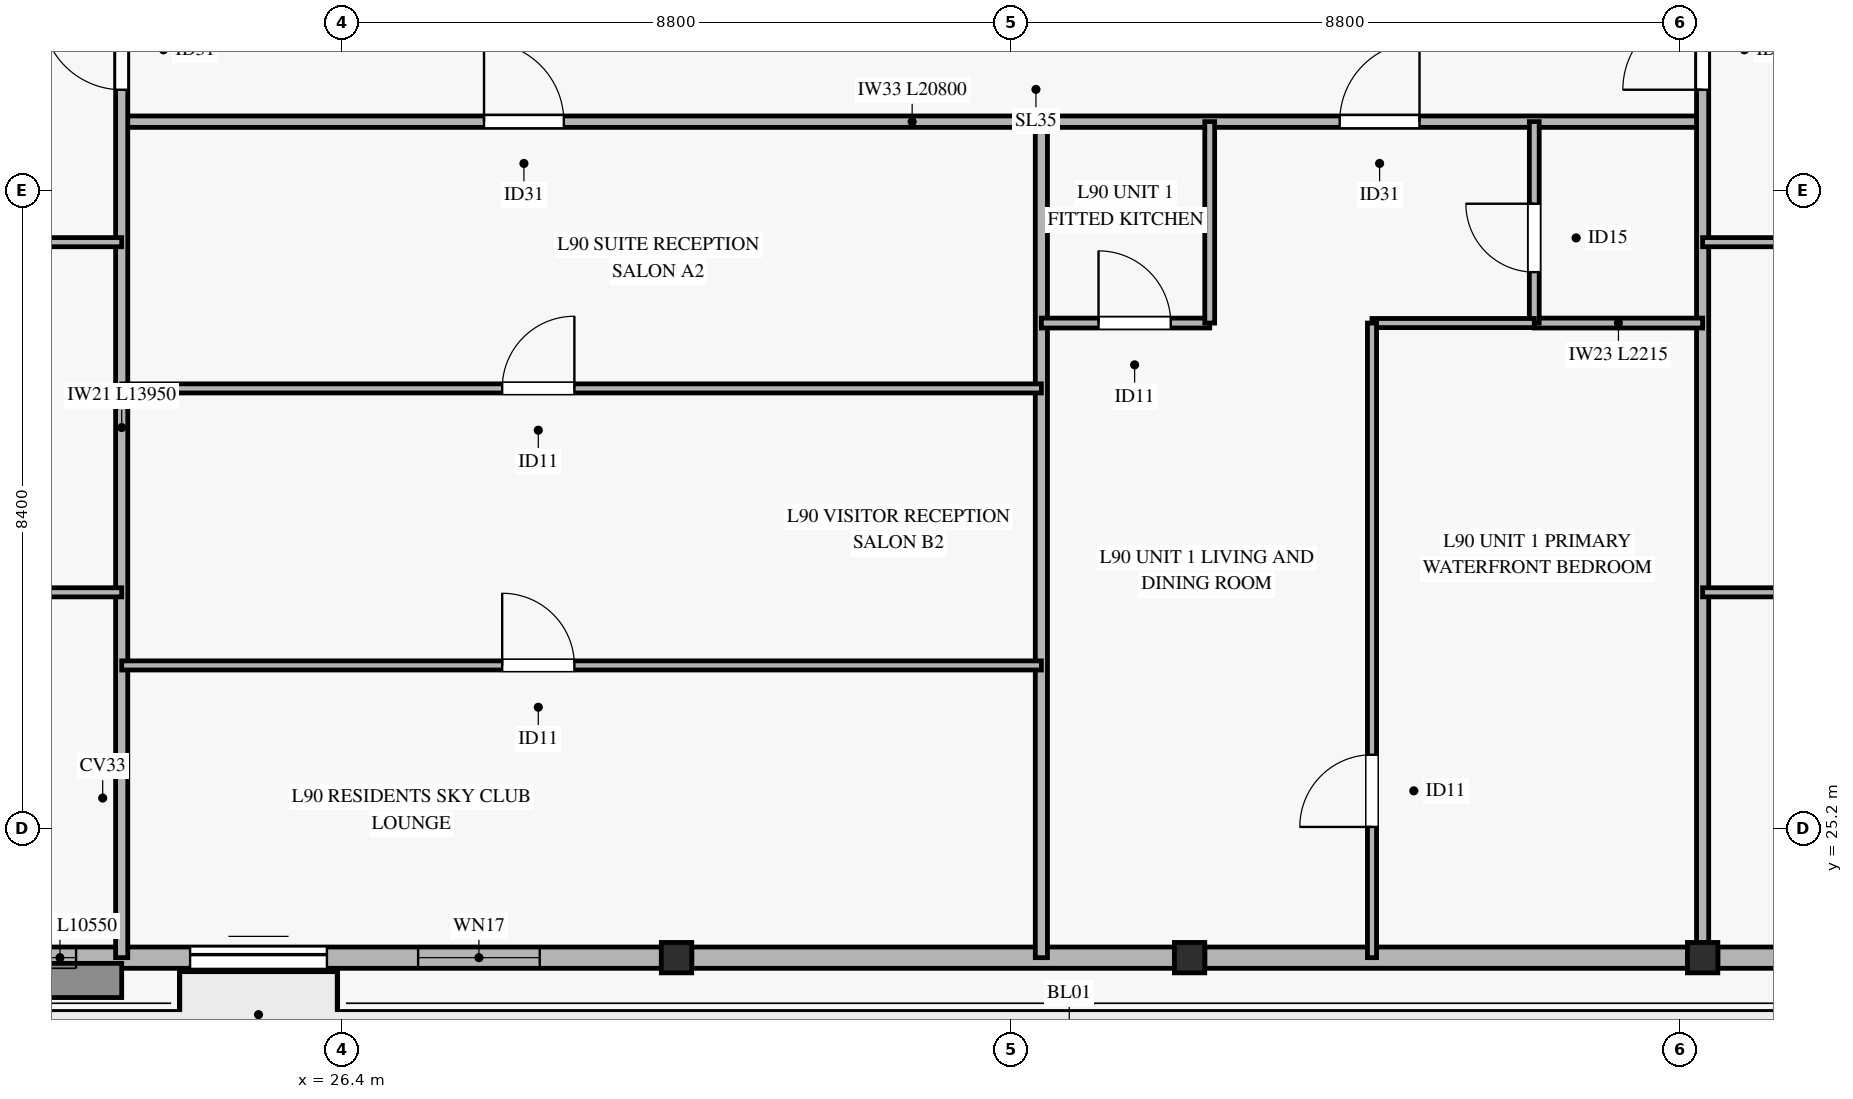
"""IFC4 building model, lengths in metres.
Left out: names, types, materials, properties, quantities, classifications, styles, units other than length and angle.
Written with IfcOpenShell. Run it as: python <this file> out.ifc"""

import sys

from ifc_helpers import new_model, si_unit, direction, frame, frame_2d, origin, origin_2d, place, context, subcontext, project, spatial, rectangle, hollow_rectangle, extrude, source, transform, mapped, element, fill, save


model = new_model("IFC4")
c1 = context("Model", 3, precision=1e-05, world=origin(), true_north=direction((0.0, 1.0)))
c2 = subcontext(c1, "Body", "Model", "MODEL_VIEW")
j1 = project(units=[si_unit("LENGTHUNIT", "METRE"), si_unit("PLANEANGLEUNIT", "RADIAN")], contexts=[c1])
p1 = place(None, origin())
s1 = spatial("IfcSite", under=j1, at=p1, CompositionType="ELEMENT")
p2 = place(p1, origin())
s2 = spatial("IfcBuilding", under=s1, at=p2, CompositionType="ELEMENT")
p3 = place(p2, frame((0.0, 0.0, 345.9)))
s3 = spatial("IfcBuildingStorey", under=s2, at=p3, CompositionType="ELEMENT", Elevation=345.9)
m1 = source(origin(), c2, "Body", "SweptSolid", [
    extrude(hollow_rectangle(XDim=0.4, YDim=0.4, WallThickness=0.02, at=origin_2d()), origin(), (0.0, 0.0, 1.0), 3.185),
])
for number, where, z_axis, x_axis in (
    (1, (30.8, 23.5, 0.0), (0.0, 0.0, 1.0), (1.0, 0.0, 0.0)),
    (2, (37.55, 23.5, 0.0), (0.0, 0.0, 1.0), (1.0, 0.0, 0.0)),
    (3, (44.3, 23.5, 0.0), (0.0, 0.0, 1.0), (1.0, 0.0, 0.0)),
):
    element("IfcColumn", number, at=place(p3, frame(where, z_axis=z_axis, x_axis=x_axis)), inside=s3, PredefinedType="COLUMN", context=c2, shape_type="MappedRepresentation", body=[
        mapped(m1, transform((0.0, 0.0, 0.0), x_axis=(1.0, 0.0, 0.0), y_axis=(0.0, 1.0, 0.0), z_axis=(0.0, 0.0, 1.0), scale=1.0)),
    ])
p4 = place(p3, frame((20.05, 23.5, 0.0), z_axis=(0.0, 0.0, 1.0), x_axis=(1.0, 0.0, 0.0)))
e4 = element("IfcWall", 4, at=p4, inside=s3, PredefinedType="SOLIDWALL", context=c2, shape_type="SweptSolid", body=[
    extrude(rectangle(XDim=10.55, YDim=0.28, at=frame_2d((5.275, 0.0))), origin(), (0.0, 0.0, 1.0), 2.815),
])
p5 = place(p4, frame((4.35, 0.0, 0.0)))
e5 = element("IfcOpeningElement", 5, at=p5, cuts=e4, PredefinedType="OPENING", context=c2, shape_type="SweptSolid", body=[
    extrude(rectangle(XDim=1.8, YDim=2.25, at=frame_2d((0.9, 1.125))), frame((0.0, 0.15, 0.0), z_axis=(0.0, -1.0, 0.0), x_axis=(1.0, 0.0, 0.0)), (0.0, 0.0, 1.0), 0.3),
])
p6 = place(p4, frame((0.65, 0.0, 0.45)))
e6 = element("IfcOpeningElement", 6, at=p6, cuts=e4, PredefinedType="OPENING", context=c2, shape_type="SweptSolid", body=[
    extrude(rectangle(XDim=2.2, YDim=2.1, at=frame_2d((1.1, 1.05))), frame((0.0, 0.15, 0.0), z_axis=(0.0, -1.0, 0.0), x_axis=(1.0, 0.0, 0.0)), (0.0, 0.0, 1.0), 0.3),
])
p7 = place(p4, frame((7.35, 0.0, 0.45)))
e7 = element("IfcOpeningElement", 7, at=p7, cuts=e4, PredefinedType="OPENING", context=c2, shape_type="SweptSolid", body=[
    extrude(rectangle(XDim=1.6, YDim=2.0, at=frame_2d((0.8, 1.0))), frame((0.0, 0.15, 0.0), z_axis=(0.0, -1.0, 0.0), x_axis=(1.0, 0.0, 0.0)), (0.0, 0.0, 1.0), 0.3),
])
for number, where, z_axis, x_axis in (
    (8, (31.0, 23.5, 0.0), (0.0, 0.0, 1.0), (1.0, 0.0, 0.0)),
    (9, (37.75, 23.5, 0.0), (0.0, 0.0, 1.0), (1.0, 0.0, 0.0)),
):
    element("IfcWall", number, at=place(p3, frame(where, z_axis=z_axis, x_axis=x_axis)), inside=s3, PredefinedType="SOLIDWALL", context=c2, shape_type="SweptSolid", body=[
        extrude(rectangle(XDim=6.35, YDim=0.28, at=frame_2d((3.175, 0.0))), origin(), (0.0, 0.0, 1.0), 2.815),
    ])
p8 = place(p3, frame((44.5, 23.5, 0.0), z_axis=(0.0, 0.0, 1.0), x_axis=(1.0, 0.0, 0.0)))
e10 = element("IfcWall", 10, at=p8, inside=s3, PredefinedType="SOLIDWALL", context=c2, shape_type="SweptSolid", body=[
    extrude(rectangle(XDim=5.85, YDim=0.28, at=frame_2d((2.925, 0.0))), origin(), (0.0, 0.0, 1.0), 2.815),
])
p9 = place(p8, frame((2.0, 0.0, 0.0)))
e11 = element("IfcOpeningElement", 11, at=p9, cuts=e10, PredefinedType="OPENING", context=c2, shape_type="SweptSolid", body=[
    extrude(rectangle(XDim=1.8, YDim=2.25, at=frame_2d((0.9, 1.125))), frame((0.0, 0.15, 0.0), z_axis=(0.0, -1.0, 0.0), x_axis=(1.0, 0.0, 0.0)), (0.0, 0.0, 1.0), 0.3),
])
p10 = place(p3, frame((23.5, 34.5, 0.0), z_axis=(0.0, 0.0, 1.0), x_axis=(1.0, 0.0, 0.0)))
e12 = element("IfcWall", 12, at=p10, inside=s3, PredefinedType="PARTITIONING", context=c2, shape_type="SweptSolid", body=[
    extrude(rectangle(XDim=20.8, YDim=0.15, at=frame_2d((10.4, 0.0))), origin(), (0.0, 0.0, 1.0), 2.47),
])
p11 = place(p10, frame((4.767, 0.0, 0.0)))
e13 = element("IfcOpeningElement", 13, at=p11, cuts=e12, PredefinedType="OPENING", context=c2, shape_type="SweptSolid", body=[
    extrude(rectangle(XDim=1.05, YDim=2.15, at=frame_2d((0.525, 1.075))), frame((0.0, 0.085, 0.0), z_axis=(0.0, -1.0, 0.0), x_axis=(1.0, 0.0, 0.0)), (0.0, 0.0, 1.0), 0.17),
])
p12 = place(p10, frame((16.025, 0.0, 0.0)))
e14 = element("IfcOpeningElement", 14, at=p12, cuts=e12, PredefinedType="OPENING", context=c2, shape_type="SweptSolid", body=[
    extrude(rectangle(XDim=1.05, YDim=2.15, at=frame_2d((0.525, 1.075))), frame((0.0, 0.085, 0.0), z_axis=(0.0, -1.0, 0.0), x_axis=(1.0, 0.0, 0.0)), (0.0, 0.0, 1.0), 0.17),
])
p13 = place(p3, frame((23.5, 23.5, 0.0), z_axis=(0.0, 0.0, 1.0), x_axis=(0.0, 1.0, 0.0)))
e15 = element("IfcWall", 15, at=p13, inside=s3, PredefinedType="PARTITIONING", context=c2, shape_type="SweptSolid", body=[
    extrude(rectangle(XDim=13.95, YDim=0.16, at=frame_2d((6.975, 0.0))), origin(), (0.0, 0.0, 1.0), 2.77),
])
p14 = place(p13, frame((11.42, 0.0, 0.0)))
e16 = element("IfcOpeningElement", 16, at=p14, cuts=e15, PredefinedType="OPENING", context=c2, shape_type="SweptSolid", body=[
    extrude(rectangle(XDim=1.05, YDim=2.15, at=frame_2d((0.525, 1.075))), frame((0.0, 0.09, 0.0), z_axis=(0.0, -1.0, 0.0), x_axis=(1.0, 0.0, 0.0)), (0.0, 0.0, 1.0), 0.18),
])
p15 = place(p3, frame((35.6, 23.5, 0.0), z_axis=(0.0, 0.0, 1.0), x_axis=(0.0, 1.0, 0.0)))
e17 = element("IfcWall", 17, at=p15, inside=s3, PredefinedType="PARTITIONING", context=c2, shape_type="SweptSolid", body=[
    extrude(rectangle(XDim=11.0, YDim=0.16, at=frame_2d((5.5, 0.0))), origin(), (0.0, 0.0, 1.0), 2.77),
])
p16 = place(p3, frame((44.3, 23.5, 0.0), z_axis=(0.0, 0.0, 1.0), x_axis=(0.0, 1.0, 0.0)))
e18 = element("IfcWall", 18, at=p16, inside=s3, PredefinedType="PARTITIONING", context=c2, shape_type="SweptSolid", body=[
    extrude(rectangle(XDim=13.95, YDim=0.16, at=frame_2d((6.975, 0.0))), origin(), (0.0, 0.0, 1.0), 2.47),
])
p17 = place(p16, frame((11.42, 0.0, 0.0)))
e19 = element("IfcOpeningElement", 19, at=p17, cuts=e18, PredefinedType="OPENING", context=c2, shape_type="SweptSolid", body=[
    extrude(rectangle(XDim=1.05, YDim=2.15, at=frame_2d((0.525, 1.075))), frame((0.0, 0.09, 0.0), z_axis=(0.0, -1.0, 0.0), x_axis=(1.0, 0.0, 0.0)), (0.0, 0.0, 1.0), 0.18),
])
p18 = place(p3, frame((12.1, 28.307, 0.0), z_axis=(0.0, 0.0, 1.0), x_axis=(1.0, 0.0, 0.0)))
e20 = element("IfcWall", 20, at=p18, inside=s3, PredefinedType="PARTITIONING", context=c2, shape_type="SweptSolid", body=[
    extrude(rectangle(XDim=11.4, YDim=0.12, at=frame_2d((5.7, 0.0))), origin(), (0.0, 0.0, 1.0), 2.47),
])
p19 = place(p18, frame((4.846, 0.0, 0.0)))
e21 = element("IfcOpeningElement", 21, at=p19, cuts=e20, PredefinedType="OPENING", context=c2, shape_type="SweptSolid", body=[
    extrude(rectangle(XDim=0.95, YDim=2.1, at=frame_2d((0.475, 1.05))), frame((0.0, 0.07, 0.0), z_axis=(0.0, -1.0, 0.0), x_axis=(1.0, 0.0, 0.0)), (0.0, 0.0, 1.0), 0.14),
])
p20 = place(p3, frame((12.1, 32.914, 0.0), z_axis=(0.0, 0.0, 1.0), x_axis=(1.0, 0.0, 0.0)))
e22 = element("IfcWall", 22, at=p20, inside=s3, PredefinedType="PARTITIONING", context=c2, shape_type="SweptSolid", body=[
    extrude(rectangle(XDim=11.4, YDim=0.12, at=frame_2d((5.7, 0.0))), origin(), (0.0, 0.0, 1.0), 2.47),
])
p21 = place(p20, frame((4.846, 0.0, 0.0)))
e23 = element("IfcOpeningElement", 23, at=p21, cuts=e22, PredefinedType="OPENING", context=c2, shape_type="SweptSolid", body=[
    extrude(rectangle(XDim=0.95, YDim=2.1, at=frame_2d((0.475, 1.05))), frame((0.0, 0.07, 0.0), z_axis=(0.0, -1.0, 0.0), x_axis=(1.0, 0.0, 0.0)), (0.0, 0.0, 1.0), 0.14),
])
p22 = place(p3, frame((23.5, 27.345, 0.0), z_axis=(0.0, 0.0, 1.0), x_axis=(1.0, 0.0, 0.0)))
e24 = element("IfcWall", 24, at=p22, inside=s3, PredefinedType="PARTITIONING", context=c2, shape_type="SweptSolid", body=[
    extrude(rectangle(XDim=12.1, YDim=0.12, at=frame_2d((6.05, 0.0))), origin(), (0.0, 0.0, 1.0), 2.47),
])
p23 = place(p22, frame((5.006, 0.0, 0.0)))
e25 = element("IfcOpeningElement", 25, at=p23, cuts=e24, PredefinedType="OPENING", context=c2, shape_type="SweptSolid", body=[
    extrude(rectangle(XDim=0.95, YDim=2.1, at=frame_2d((0.475, 1.05))), frame((0.0, 0.07, 0.0), z_axis=(0.0, -1.0, 0.0), x_axis=(1.0, 0.0, 0.0)), (0.0, 0.0, 1.0), 0.14),
])
p24 = place(p3, frame((23.5, 30.99, 0.0), z_axis=(0.0, 0.0, 1.0), x_axis=(1.0, 0.0, 0.0)))
e26 = element("IfcWall", 26, at=p24, inside=s3, PredefinedType="PARTITIONING", context=c2, shape_type="SweptSolid", body=[
    extrude(rectangle(XDim=12.1, YDim=0.12, at=frame_2d((6.05, 0.0))), origin(), (0.0, 0.0, 1.0), 2.47),
])
p25 = place(p24, frame((5.006, 0.0, 0.0)))
e27 = element("IfcOpeningElement", 27, at=p25, cuts=e26, PredefinedType="OPENING", context=c2, shape_type="SweptSolid", body=[
    extrude(rectangle(XDim=0.95, YDim=2.1, at=frame_2d((0.475, 1.05))), frame((0.0, 0.07, 0.0), z_axis=(0.0, -1.0, 0.0), x_axis=(1.0, 0.0, 0.0)), (0.0, 0.0, 1.0), 0.14),
])
p26 = place(p3, frame((35.6, 31.85, 0.0), z_axis=(0.0, 0.0, 1.0), x_axis=(1.0, 0.0, 0.0)))
e28 = element("IfcWall", 28, at=p26, inside=s3, PredefinedType="PARTITIONING", context=c2, shape_type="SweptSolid", body=[
    extrude(rectangle(XDim=2.215, YDim=0.13, at=frame_2d((1.107, 0.0))), origin(), (0.0, 0.0, 1.0), 2.47),
])
p27 = place(p26, frame((0.752, 0.0, 0.0)))
e29 = element("IfcOpeningElement", 29, at=p27, cuts=e28, PredefinedType="OPENING", context=c2, shape_type="SweptSolid", body=[
    extrude(rectangle(XDim=0.95, YDim=2.1, at=frame_2d((0.475, 1.05))), frame((0.0, 0.075, 0.0), z_axis=(0.0, -1.0, 0.0), x_axis=(1.0, 0.0, 0.0)), (0.0, 0.0, 1.0), 0.15),
])
p28 = place(p3, frame((37.815, 31.85, 0.0), z_axis=(0.0, 0.0, 1.0), x_axis=(0.0, 1.0, 0.0)))
e30 = element("IfcWall", 30, at=p28, inside=s3, PredefinedType="PARTITIONING", context=c2, shape_type="SweptSolid", body=[
    extrude(rectangle(XDim=2.65, YDim=0.13, at=frame_2d((1.325, 0.0))), origin(), (0.0, 0.0, 1.0), 2.77),
])
p29 = place(p3, frame((42.085, 31.85, 0.0), z_axis=(0.0, 0.0, 1.0), x_axis=(1.0, 0.0, 0.0)))
e31 = element("IfcWall", 31, at=p29, inside=s3, PredefinedType="PARTITIONING", context=c2, shape_type="SweptSolid", body=[
    extrude(rectangle(XDim=2.215, YDim=0.13, at=frame_2d((1.107, 0.0))), origin(), (0.0, 0.0, 1.0), 2.47),
])
p30 = place(p3, frame((42.085, 31.85, 0.0), z_axis=(0.0, 0.0, 1.0), x_axis=(0.0, 1.0, 0.0)))
e32 = element("IfcWall", 32, at=p30, inside=s3, PredefinedType="PARTITIONING", context=c2, shape_type="SweptSolid", body=[
    extrude(rectangle(XDim=2.65, YDim=0.13, at=frame_2d((1.325, 0.0))), origin(), (0.0, 0.0, 1.0), 2.77),
])
p31 = place(p30, frame((0.67, 0.0, 0.0)))
e33 = element("IfcOpeningElement", 33, at=p31, cuts=e32, PredefinedType="OPENING", context=c2, shape_type="SweptSolid", body=[
    extrude(rectangle(XDim=0.9, YDim=2.1, at=frame_2d((0.45, 1.05))), frame((0.0, 0.075, 0.0), z_axis=(0.0, -1.0, 0.0), x_axis=(1.0, 0.0, 0.0)), (0.0, 0.0, 1.0), 0.15),
])
p32 = place(p3, frame((39.95, 31.85, 0.0), z_axis=(0.0, 0.0, 1.0), x_axis=(1.0, 0.0, 0.0)))
e34 = element("IfcWall", 34, at=p32, inside=s3, PredefinedType="PARTITIONING", context=c2, shape_type="SweptSolid", body=[
    extrude(rectangle(XDim=2.135, YDim=0.12, at=frame_2d((1.067, 0.0))), origin(), (0.0, 0.0, 1.0), 3.185),
])
p33 = place(p3, frame((39.95, 23.5, 0.0), z_axis=(0.0, 0.0, 1.0), x_axis=(0.0, 1.0, 0.0)))
e35 = element("IfcWall", 35, at=p33, inside=s3, PredefinedType="PARTITIONING", context=c2, shape_type="SweptSolid", body=[
    extrude(rectangle(XDim=8.35, YDim=0.12, at=frame_2d((4.175, 0.0))), origin(), (0.0, 0.0, 1.0), 2.77),
])
p34 = place(p33, frame((1.72, 0.0, 0.0)))
e36 = element("IfcOpeningElement", 36, at=p34, cuts=e35, PredefinedType="OPENING", context=c2, shape_type="SweptSolid", body=[
    extrude(rectangle(XDim=0.95, YDim=2.1, at=frame_2d((0.475, 1.05))), frame((0.0, 0.07, 0.0), z_axis=(0.0, -1.0, 0.0), x_axis=(1.0, 0.0, 0.0)), (0.0, 0.0, 1.0), 0.14),
])
p35 = place(p3, frame((44.3, 28.307, 0.0), z_axis=(0.0, 0.0, 1.0), x_axis=(1.0, 0.0, 0.0)))
e37 = element("IfcWall", 37, at=p35, inside=s3, PredefinedType="PARTITIONING", context=c2, shape_type="SweptSolid", body=[
    extrude(rectangle(XDim=14.0, YDim=0.12, at=frame_2d((7.0, 0.0))), origin(), (0.0, 0.0, 1.0), 2.47),
])
p36 = place(p35, frame((5.686, 0.0, 0.0)))
e38 = element("IfcOpeningElement", 38, at=p36, cuts=e37, PredefinedType="OPENING", context=c2, shape_type="SweptSolid", body=[
    extrude(rectangle(XDim=0.95, YDim=2.1, at=frame_2d((0.475, 1.05))), frame((0.0, 0.07, 0.0), z_axis=(0.0, -1.0, 0.0), x_axis=(1.0, 0.0, 0.0)), (0.0, 0.0, 1.0), 0.14),
])
p37 = place(p3, frame((44.3, 32.914, 0.0), z_axis=(0.0, 0.0, 1.0), x_axis=(1.0, 0.0, 0.0)))
e39 = element("IfcWall", 39, at=p37, inside=s3, PredefinedType="PARTITIONING", context=c2, shape_type="SweptSolid", body=[
    extrude(rectangle(XDim=14.0, YDim=0.12, at=frame_2d((7.0, 0.0))), origin(), (0.0, 0.0, 1.0), 2.47),
])
p38 = place(p37, frame((5.686, 0.0, 0.0)))
e40 = element("IfcOpeningElement", 40, at=p38, cuts=e39, PredefinedType="OPENING", context=c2, shape_type="SweptSolid", body=[
    extrude(rectangle(XDim=0.95, YDim=2.1, at=frame_2d((0.475, 1.05))), frame((0.0, 0.07, 0.0), z_axis=(0.0, -1.0, 0.0), x_axis=(1.0, 0.0, 0.0)), (0.0, 0.0, 1.0), 0.14),
])
m2 = source(origin(), c2, "Body", "SweptSolid", [
    extrude(rectangle(XDim=1.8, YDim=2.25, at=frame_2d((0.9, 1.125))), frame((0.0, 0.025, 0.0), z_axis=(0.0, -1.0, 0.0), x_axis=(1.0, 0.0, 0.0)), (0.0, 0.0, 1.0), 0.05),
])
p39 = place(p5, origin())
e41 = element("IfcDoor", 41, at=p39, inside=s3, OperationType="SLIDING_TO_LEFT", PredefinedType="DOOR", context=c2, shape_type="MappedRepresentation", body=[
    mapped(m2, transform((0.0, 0.0, 0.0), x_axis=(1.0, 0.0, 0.0), y_axis=(0.0, 1.0, 0.0), z_axis=(0.0, 0.0, 1.0), scale=1.0)),
])
fill(e5, e41)
m3 = source(origin(), c2, "Body", "SweptSolid", [
    extrude(rectangle(XDim=2.2, YDim=2.1, at=frame_2d((1.1, 1.05))), frame((0.0, 0.03, 0.0), z_axis=(0.0, -1.0, 0.0), x_axis=(1.0, 0.0, 0.0)), (0.0, 0.0, 1.0), 0.06),
])
p40 = place(p6, origin())
e42 = element("IfcWindow", 42, at=p40, inside=s3, PartitioningType="SINGLE_PANEL", PredefinedType="WINDOW", context=c2, shape_type="MappedRepresentation", body=[
    mapped(m3, transform((0.0, 0.0, 0.0), x_axis=(1.0, 0.0, 0.0), y_axis=(0.0, 1.0, 0.0), z_axis=(0.0, 0.0, 1.0), scale=1.0)),
])
fill(e6, e42)
m4 = source(origin(), c2, "Body", "SweptSolid", [
    extrude(rectangle(XDim=1.6, YDim=2.0, at=frame_2d((0.8, 1.0))), frame((0.0, 0.03, 0.0), z_axis=(0.0, -1.0, 0.0), x_axis=(1.0, 0.0, 0.0)), (0.0, 0.0, 1.0), 0.06),
])
p41 = place(p7, origin())
e43 = element("IfcWindow", 43, at=p41, inside=s3, PartitioningType="SINGLE_PANEL", PredefinedType="WINDOW", context=c2, shape_type="MappedRepresentation", body=[
    mapped(m4, transform((0.0, 0.0, 0.0), x_axis=(1.0, 0.0, 0.0), y_axis=(0.0, 1.0, 0.0), z_axis=(0.0, 0.0, 1.0), scale=1.0)),
])
fill(e7, e43)
m5 = source(origin(), c2, "Body", "SweptSolid", [
    extrude(rectangle(XDim=1.05, YDim=2.15, at=frame_2d((0.525, 1.075))), frame((0.0, 0.025, 0.0), z_axis=(0.0, -1.0, 0.0), x_axis=(1.0, 0.0, 0.0)), (0.0, 0.0, 1.0), 0.05),
])
p42 = place(p14, origin())
e44 = element("IfcDoor", 44, at=p42, inside=s3, OperationType="SINGLE_SWING_RIGHT", PredefinedType="DOOR", context=c2, shape_type="MappedRepresentation", body=[
    mapped(m5, transform((0.0, 0.0, 0.0), x_axis=(1.0, 0.0, 0.0), y_axis=(0.0, 1.0, 0.0), z_axis=(0.0, 0.0, 1.0), scale=1.0)),
])
fill(e16, e44)
p43 = place(p11, origin())
e45 = element("IfcDoor", 45, at=p43, inside=s3, OperationType="SINGLE_SWING_LEFT", PredefinedType="DOOR", context=c2, shape_type="MappedRepresentation", body=[
    mapped(m5, transform((0.0, 0.0, 0.0), x_axis=(1.0, 0.0, 0.0), y_axis=(0.0, 1.0, 0.0), z_axis=(0.0, 0.0, 1.0), scale=1.0)),
])
fill(e13, e45)
m6 = source(origin(), c2, "Body", "SweptSolid", [
    extrude(rectangle(XDim=0.95, YDim=2.1, at=frame_2d((0.475, 1.05))), frame((0.0, 0.025, 0.0), z_axis=(0.0, -1.0, 0.0), x_axis=(1.0, 0.0, 0.0)), (0.0, 0.0, 1.0), 0.05),
])
p44 = place(p25, origin())
e46 = element("IfcDoor", 46, at=p44, inside=s3, OperationType="SINGLE_SWING_RIGHT", PredefinedType="DOOR", context=c2, shape_type="MappedRepresentation", body=[
    mapped(m6, transform((0.0, 0.0, 0.0), x_axis=(1.0, 0.0, 0.0), y_axis=(0.0, 1.0, 0.0), z_axis=(0.0, 0.0, 1.0), scale=1.0)),
])
fill(e27, e46)
p45 = place(p23, origin())
e47 = element("IfcDoor", 47, at=p45, inside=s3, OperationType="SINGLE_SWING_LEFT", PredefinedType="DOOR", context=c2, shape_type="MappedRepresentation", body=[
    mapped(m6, transform((0.0, 0.0, 0.0), x_axis=(1.0, 0.0, 0.0), y_axis=(0.0, 1.0, 0.0), z_axis=(0.0, 0.0, 1.0), scale=1.0)),
])
fill(e25, e47)
p46 = place(p12, origin())
e48 = element("IfcDoor", 48, at=p46, inside=s3, OperationType="SINGLE_SWING_RIGHT", PredefinedType="DOOR", context=c2, shape_type="MappedRepresentation", body=[
    mapped(m5, transform((0.0, 0.0, 0.0), x_axis=(1.0, 0.0, 0.0), y_axis=(0.0, 1.0, 0.0), z_axis=(0.0, 0.0, 1.0), scale=1.0)),
])
fill(e14, e48)
p47 = place(p27, origin())
e49 = element("IfcDoor", 49, at=p47, inside=s3, OperationType="SINGLE_SWING_LEFT", PredefinedType="DOOR", context=c2, shape_type="MappedRepresentation", body=[
    mapped(m6, transform((0.0, 0.0, 0.0), x_axis=(1.0, 0.0, 0.0), y_axis=(0.0, 1.0, 0.0), z_axis=(0.0, 0.0, 1.0), scale=1.0)),
])
fill(e29, e49)
m7 = source(origin(), c2, "Body", "SweptSolid", [
    extrude(rectangle(XDim=0.9, YDim=2.1, at=frame_2d((0.45, 1.05))), frame((0.0, 0.025, 0.0), z_axis=(0.0, -1.0, 0.0), x_axis=(1.0, 0.0, 0.0)), (0.0, 0.0, 1.0), 0.05),
])
p48 = place(p31, origin())
e50 = element("IfcDoor", 50, at=p48, inside=s3, OperationType="SINGLE_SWING_RIGHT", PredefinedType="DOOR", context=c2, shape_type="MappedRepresentation", body=[
    mapped(m7, transform((0.0, 0.0, 0.0), x_axis=(1.0, 0.0, 0.0), y_axis=(0.0, 1.0, 0.0), z_axis=(0.0, 0.0, 1.0), scale=1.0)),
])
fill(e33, e50)
p49 = place(p34, origin())
e51 = element("IfcDoor", 51, at=p49, inside=s3, OperationType="SINGLE_SWING_LEFT", PredefinedType="DOOR", context=c2, shape_type="MappedRepresentation", body=[
    mapped(m6, transform((0.0, 0.0, 0.0), x_axis=(1.0, 0.0, 0.0), y_axis=(0.0, 1.0, 0.0), z_axis=(0.0, 0.0, 1.0), scale=1.0)),
])
fill(e36, e51)
p50 = place(p17, origin())
e52 = element("IfcDoor", 52, at=p50, inside=s3, OperationType="SINGLE_SWING_LEFT", PredefinedType="DOOR", context=c2, shape_type="MappedRepresentation", body=[
    mapped(m5, transform((0.0, 0.0, 0.0), x_axis=(1.0, 0.0, 0.0), y_axis=(0.0, 1.0, 0.0), z_axis=(0.0, 0.0, 1.0), scale=1.0)),
])
fill(e19, e52)
save(model, sys.argv[1])
